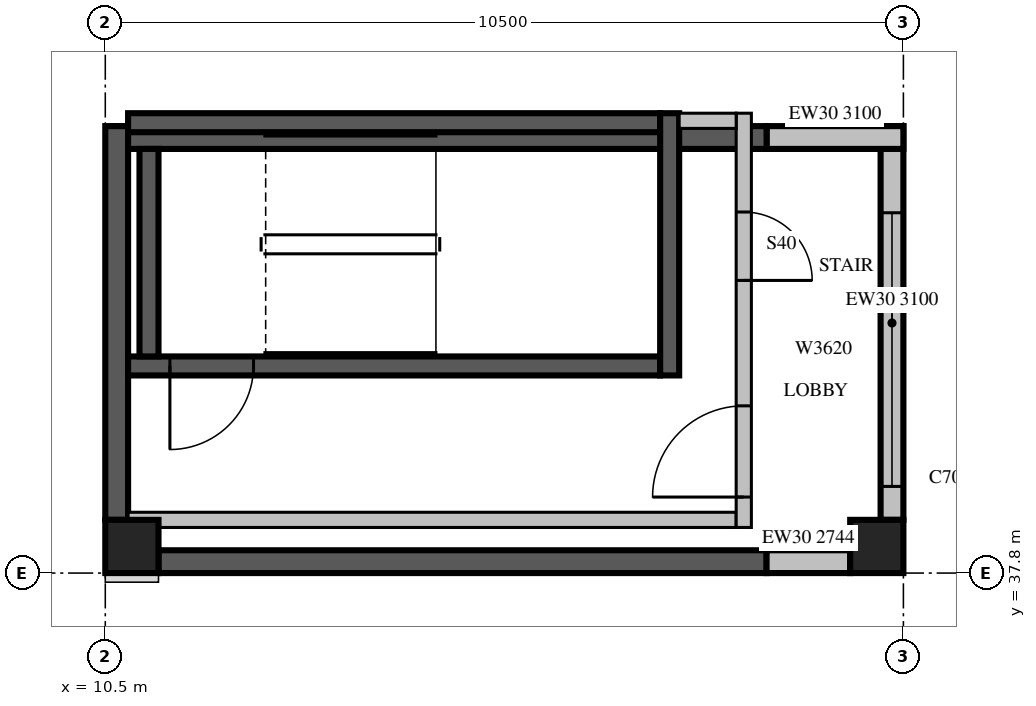
"""IFC4 building model, lengths in metres.
Left out: names, types, materials, properties, quantities, classifications, styles, units other than length and angle.
Written with IfcOpenShell. Run it as: python <this file> out.ifc"""

import sys

from ifc_helpers import new_model, si_unit, direction, frame, frame_2d, origin, origin_2d, place, context, subcontext, project, spatial, rectangle, extrude, source, transform, mapped, element, fill, save


model = new_model("IFC4")
c1 = context("Model", 3, precision=1e-05, world=origin(), true_north=direction((0.0, 1.0)))
c2 = subcontext(c1, "Body", "Model", "MODEL_VIEW")
j1 = project(units=[si_unit("LENGTHUNIT", "METRE"), si_unit("PLANEANGLEUNIT", "RADIAN")], contexts=[c1])
p1 = place(None, origin())
s1 = spatial("IfcSite", under=j1, at=p1, CompositionType="ELEMENT")
p2 = place(p1, origin())
s2 = spatial("IfcBuilding", under=s1, at=p2, CompositionType="ELEMENT")
p3 = place(p2, frame((0.0, 0.0, 312.5)))
s3 = spatial("IfcBuildingStorey", under=s2, at=p3, CompositionType="ELEMENT", Elevation=312.5)
m1 = source(origin(), c2, "Body", "SweptSolid", [
    extrude(rectangle(XDim=0.7, YDim=0.7, at=origin_2d()), origin(), (0.0, 0.0, 1.0), 3.5),
])
for number, where, z_axis, x_axis in (
    (1, (10.85, 38.15, 0.0), (0.0, 0.0, 1.0), (1.0, 0.0, 0.0)),
    (2, (20.65, 38.15, 0.0), (0.0, 0.0, 1.0), (1.0, 0.0, 0.0)),
):
    element("IfcColumn", number, at=place(p3, frame(where, z_axis=z_axis, x_axis=x_axis)), inside=s3, PredefinedType="COLUMN", context=c2, shape_type="MappedRepresentation", body=[
        mapped(m1, transform((0.0, 0.0, 0.0), scale=1.0)),
    ])
m2 = source(origin(), c2, "Body", "SweptSolid", [
    extrude(rectangle(XDim=8.0, YDim=0.3, at=frame_2d((4.0, 0.0))), origin(), (0.0, 0.0, 1.0), 3.1),
])
p4 = place(p3, frame((11.2, 37.95, 0.0), z_axis=(0.0, 0.0, 1.0), x_axis=(1.0, 0.0, 0.0)))
e3 = element("IfcWall", 3, at=p4, inside=s3, PredefinedType="SOLIDWALL", context=c2, shape_type="MappedRepresentation", body=[
    mapped(m2, transform((0.0, 0.0, 0.0), scale=1.0)),
])
p5 = place(p3, frame((19.2, 37.95, 0.0), z_axis=(0.0, 0.0, 1.0), x_axis=(1.0, 0.0, 0.0)))
e4 = element("IfcWall", 4, at=p5, inside=s3, PredefinedType="STANDARD", context=c2, shape_type="SweptSolid", body=[
    extrude(rectangle(XDim=1.1, YDim=0.3, at=frame_2d((0.55, 0.0))), origin(), (0.0, 0.0, 1.0), 2.744),
])
m3 = source(origin(), c2, "Body", "SweptSolid", [
    extrude(rectangle(XDim=5.18, YDim=0.3, at=frame_2d((2.59, 0.0))), origin(), (0.0, 0.0, 1.0), 3.1),
])
p6 = place(p3, frame((20.85, 38.5, 0.0), z_axis=(0.0, 0.0, 1.0), x_axis=(0.0, 1.0, 0.0)))
e5 = element("IfcWall", 5, at=p6, inside=s3, PredefinedType="STANDARD", context=c2, shape_type="MappedRepresentation", body=[
    mapped(m3, transform((0.0, 0.0, 0.0), scale=1.0)),
])
m4 = source(origin(), c2, "Body", "SweptSolid", [
    extrude(rectangle(XDim=3.6, YDim=2.0, at=frame_2d((1.8, 1.0))), frame((0.0, 0.16, 0.0), z_axis=(0.0, -1.0, 0.0), x_axis=(1.0, 0.0, 0.0)), (0.0, 0.0, 1.0), 0.32),
])
p7 = place(p6, frame((0.44, 0.0, 0.6)))
e6 = element("IfcOpeningElement", 6, at=p7, cuts=e5, PredefinedType="OPENING", context=c2, shape_type="MappedRepresentation", body=[
    mapped(m4, transform((0.0, 0.0, 0.0), scale=1.0)),
])
m5 = source(origin(), c2, "Body", "SweptSolid", [
    extrude(rectangle(XDim=1.8, YDim=0.3, at=frame_2d((0.9, 0.0))), origin(), (0.0, 0.0, 1.0), 3.1),
])
p8 = place(p3, frame((21.0, 43.53, 0.0), z_axis=(0.0, 0.0, 1.0), x_axis=(-1.0, 0.0, 0.0)))
e7 = element("IfcWall", 7, at=p8, inside=s3, PredefinedType="STANDARD", context=c2, shape_type="MappedRepresentation", body=[
    mapped(m5, transform((0.0, 0.0, 0.0), scale=1.0)),
])
m6 = source(origin(), c2, "Body", "SweptSolid", [
    extrude(rectangle(XDim=8.6, YDim=0.3, at=frame_2d((4.3, 0.0))), origin(), (0.0, 0.0, 1.0), 3.1),
])
p9 = place(p3, frame((19.2, 43.53, 0.0), z_axis=(0.0, 0.0, 1.0), x_axis=(-1.0, 0.0, 0.0)))
e8 = element("IfcWall", 8, at=p9, inside=s3, PredefinedType="SOLIDWALL", context=c2, shape_type="MappedRepresentation", body=[
    mapped(m6, transform((0.0, 0.0, 0.0), scale=1.0)),
])
m7 = source(origin(), c2, "Body", "SweptSolid", [
    extrude(rectangle(XDim=5.18, YDim=0.3, at=frame_2d((2.59, 0.0))), origin(), (0.0, 0.0, 1.0), 3.1),
])
p10 = place(p3, frame((10.65, 43.68, 0.0), z_axis=(0.0, 0.0, 1.0), x_axis=(0.0, -1.0, 0.0)))
e9 = element("IfcWall", 9, at=p10, inside=s3, PredefinedType="SOLIDWALL", context=c2, shape_type="MappedRepresentation", body=[
    mapped(m7, transform((0.0, 0.0, 0.0), scale=1.0)),
])
m8 = source(origin(), c2, "Body", "SweptSolid", [
    extrude(rectangle(XDim=7.0, YDim=0.25, at=frame_2d((3.5, 0.0))), origin(), (0.0, 0.0, 1.0), 3.1),
])
p11 = place(p3, frame((10.8, 40.525, 0.0), z_axis=(0.0, 0.0, 1.0), x_axis=(1.0, 0.0, 0.0)))
e10 = element("IfcWall", 10, at=p11, inside=s3, PredefinedType="SOLIDWALL", context=c2, shape_type="MappedRepresentation", body=[
    mapped(m8, transform((0.0, 0.0, 0.0), scale=1.0)),
])
m9 = source(origin(), c2, "Body", "SweptSolid", [
    extrude(rectangle(XDim=1.1, YDim=2.1, at=frame_2d((0.55, 1.05))), frame((0.0, 0.135, 0.0), z_axis=(0.0, -1.0, 0.0), x_axis=(1.0, 0.0, 0.0)), (0.0, 0.0, 1.0), 0.27),
])
p12 = place(p11, frame((0.55, 0.0, 0.0)))
e11 = element("IfcOpeningElement", 11, at=p12, cuts=e10, PredefinedType="OPENING", context=c2, shape_type="MappedRepresentation", body=[
    mapped(m9, transform((0.0, 0.0, 0.0), scale=1.0)),
])
p13 = place(p3, frame((10.8, 43.725, 0.0), z_axis=(0.0, 0.0, 1.0), x_axis=(1.0, 0.0, 0.0)))
e12 = element("IfcWall", 12, at=p13, inside=s3, PredefinedType="SOLIDWALL", context=c2, shape_type="MappedRepresentation", body=[
    mapped(m8, transform((0.0, 0.0, 0.0), scale=1.0)),
])
m10 = source(origin(), c2, "Body", "SweptSolid", [
    extrude(rectangle(XDim=3.45, YDim=0.25, at=frame_2d((1.725, 0.0))), origin(), (0.0, 0.0, 1.0), 3.1),
])
p14 = place(p3, frame((17.925, 40.4, 0.0), z_axis=(0.0, 0.0, 1.0), x_axis=(0.0, 1.0, 0.0)))
e13 = element("IfcWall", 13, at=p14, inside=s3, PredefinedType="SOLIDWALL", context=c2, shape_type="MappedRepresentation", body=[
    mapped(m10, transform((0.0, 0.0, 0.0), scale=1.0)),
])
m11 = source(origin(), c2, "Body", "SweptSolid", [
    extrude(rectangle(XDim=2.73, YDim=0.25, at=frame_2d((1.365, 0.0))), origin(), (0.0, 0.0, 1.0), 3.1),
])
p15 = place(p3, frame((11.075, 40.65, 0.0), z_axis=(0.0, 0.0, 1.0), x_axis=(0.0, 1.0, 0.0)))
e14 = element("IfcWall", 14, at=p15, inside=s3, PredefinedType="SOLIDWALL", context=c2, shape_type="MappedRepresentation", body=[
    mapped(m11, transform((0.0, 0.0, 0.0), scale=1.0)),
])
m12 = source(origin(), c2, "Body", "SweptSolid", [
    extrude(rectangle(XDim=8.0, YDim=0.2, at=frame_2d((4.0, 0.0))), origin(), (0.0, 0.0, 1.0), 3.1),
])
p16 = place(p3, frame((10.8, 38.5, 0.0), z_axis=(0.0, 0.0, 1.0), x_axis=(1.0, 0.0, 0.0)))
e15 = element("IfcWall", 15, at=p16, inside=s3, PredefinedType="PARTITIONING", context=c2, shape_type="MappedRepresentation", body=[
    mapped(m12, transform((0.0, 0.0, 0.0), scale=1.0)),
])
m13 = source(origin(), c2, "Body", "SweptSolid", [
    extrude(rectangle(XDim=5.45, YDim=0.2, at=frame_2d((2.725, 0.0))), origin(), (0.0, 0.0, 1.0), 3.1),
])
p17 = place(p3, frame((18.9, 38.4, 0.0), z_axis=(0.0, 0.0, 1.0), x_axis=(0.0, 1.0, 0.0)))
e16 = element("IfcWall", 16, at=p17, inside=s3, PredefinedType="PARTITIONING", context=c2, shape_type="MappedRepresentation", body=[
    mapped(m13, transform((0.0, 0.0, 0.0), scale=1.0)),
])
m14 = source(origin(), c2, "Body", "SweptSolid", [
    extrude(rectangle(XDim=1.2, YDim=2.1, at=frame_2d((0.6, 1.05))), frame((0.0, 0.11, 0.0), z_axis=(0.0, -1.0, 0.0), x_axis=(1.0, 0.0, 0.0)), (0.0, 0.0, 1.0), 0.22),
])
p18 = place(p17, frame((0.4, 0.0, 0.0)))
e17 = element("IfcOpeningElement", 17, at=p18, cuts=e16, PredefinedType="OPENING", context=c2, shape_type="MappedRepresentation", body=[
    mapped(m14, transform((0.0, 0.0, 0.0), scale=1.0)),
])
m15 = source(origin(), c2, "Body", "SweptSolid", [
    extrude(rectangle(XDim=0.9, YDim=2.1, at=frame_2d((0.45, 1.05))), frame((0.0, 0.11, 0.0), z_axis=(0.0, -1.0, 0.0), x_axis=(1.0, 0.0, 0.0)), (0.0, 0.0, 1.0), 0.22),
])
p19 = place(p17, frame((3.25, 0.0, 0.0)))
e18 = element("IfcOpeningElement", 18, at=p19, cuts=e16, PredefinedType="OPENING", context=c2, shape_type="MappedRepresentation", body=[
    mapped(m15, transform((0.0, 0.0, 0.0), scale=1.0)),
])
m16 = source(origin(), c2, "Body", "SweptSolid", [
    extrude(rectangle(XDim=0.75, YDim=0.2, at=frame_2d((0.375, 0.0))), origin(), (0.0, 0.0, 1.0), 3.1),
])
p20 = place(p3, frame((18.05, 43.75, 0.0), z_axis=(0.0, 0.0, 1.0), x_axis=(1.0, 0.0, 0.0)))
e19 = element("IfcWall", 19, at=p20, inside=s3, PredefinedType="PARTITIONING", context=c2, shape_type="MappedRepresentation", body=[
    mapped(m16, transform((0.0, 0.0, 0.0), scale=1.0)),
])
m17 = source(origin(), c2, "Body", "SweptSolid", [
    extrude(rectangle(XDim=3.6, YDim=2.0, at=frame_2d((1.8, 1.0))), frame((0.0, 0.03, 0.0), z_axis=(0.0, -1.0, 0.0), x_axis=(1.0, 0.0, 0.0)), (0.0, 0.0, 1.0), 0.06),
])
p21 = place(p7, origin())
e20 = element("IfcWindow", 20, at=p21, inside=s3, PartitioningType="SINGLE_PANEL", PredefinedType="WINDOW", context=c2, shape_type="MappedRepresentation", body=[
    mapped(m17, transform((0.0, 0.0, 0.0), scale=1.0)),
])
fill(e6, e20)
m18 = source(origin(), c2, "Body", "SweptSolid", [
    extrude(rectangle(XDim=1.1, YDim=2.1, at=frame_2d((0.55, 1.05))), frame((0.0, 0.025, 0.0), z_axis=(0.0, -1.0, 0.0), x_axis=(1.0, 0.0, 0.0)), (0.0, 0.0, 1.0), 0.05),
])
p22 = place(p12, origin())
e21 = element("IfcDoor", 21, at=p22, inside=s3, OperationType="SINGLE_SWING_RIGHT", PredefinedType="DOOR", context=c2, shape_type="MappedRepresentation", body=[
    mapped(m18, transform((0.0, 0.0, 0.0), scale=1.0)),
])
fill(e11, e21)
m19 = source(origin(), c2, "Body", "SweptSolid", [
    extrude(rectangle(XDim=1.2, YDim=2.1, at=frame_2d((0.6, 1.05))), frame((0.0, 0.025, 0.0), z_axis=(0.0, -1.0, 0.0), x_axis=(1.0, 0.0, 0.0)), (0.0, 0.0, 1.0), 0.05),
])
p23 = place(p18, origin())
e22 = element("IfcDoor", 22, at=p23, inside=s3, OperationType="SINGLE_SWING_LEFT", PredefinedType="DOOR", context=c2, shape_type="MappedRepresentation", body=[
    mapped(m19, transform((0.0, 0.0, 0.0), scale=1.0)),
])
fill(e17, e22)
m20 = source(origin(), c2, "Body", "SweptSolid", [
    extrude(rectangle(XDim=0.9, YDim=2.1, at=frame_2d((0.45, 1.05))), frame((0.0, 0.025, 0.0), z_axis=(0.0, -1.0, 0.0), x_axis=(1.0, 0.0, 0.0)), (0.0, 0.0, 1.0), 0.05),
])
p24 = place(p19, origin())
e23 = element("IfcDoor", 23, at=p24, inside=s3, OperationType="SINGLE_SWING_RIGHT", PredefinedType="DOOR", context=c2, shape_type="MappedRepresentation", body=[
    mapped(m20, transform((0.0, 0.0, 0.0), scale=1.0)),
])
fill(e18, e23)
save(model, sys.argv[1])
